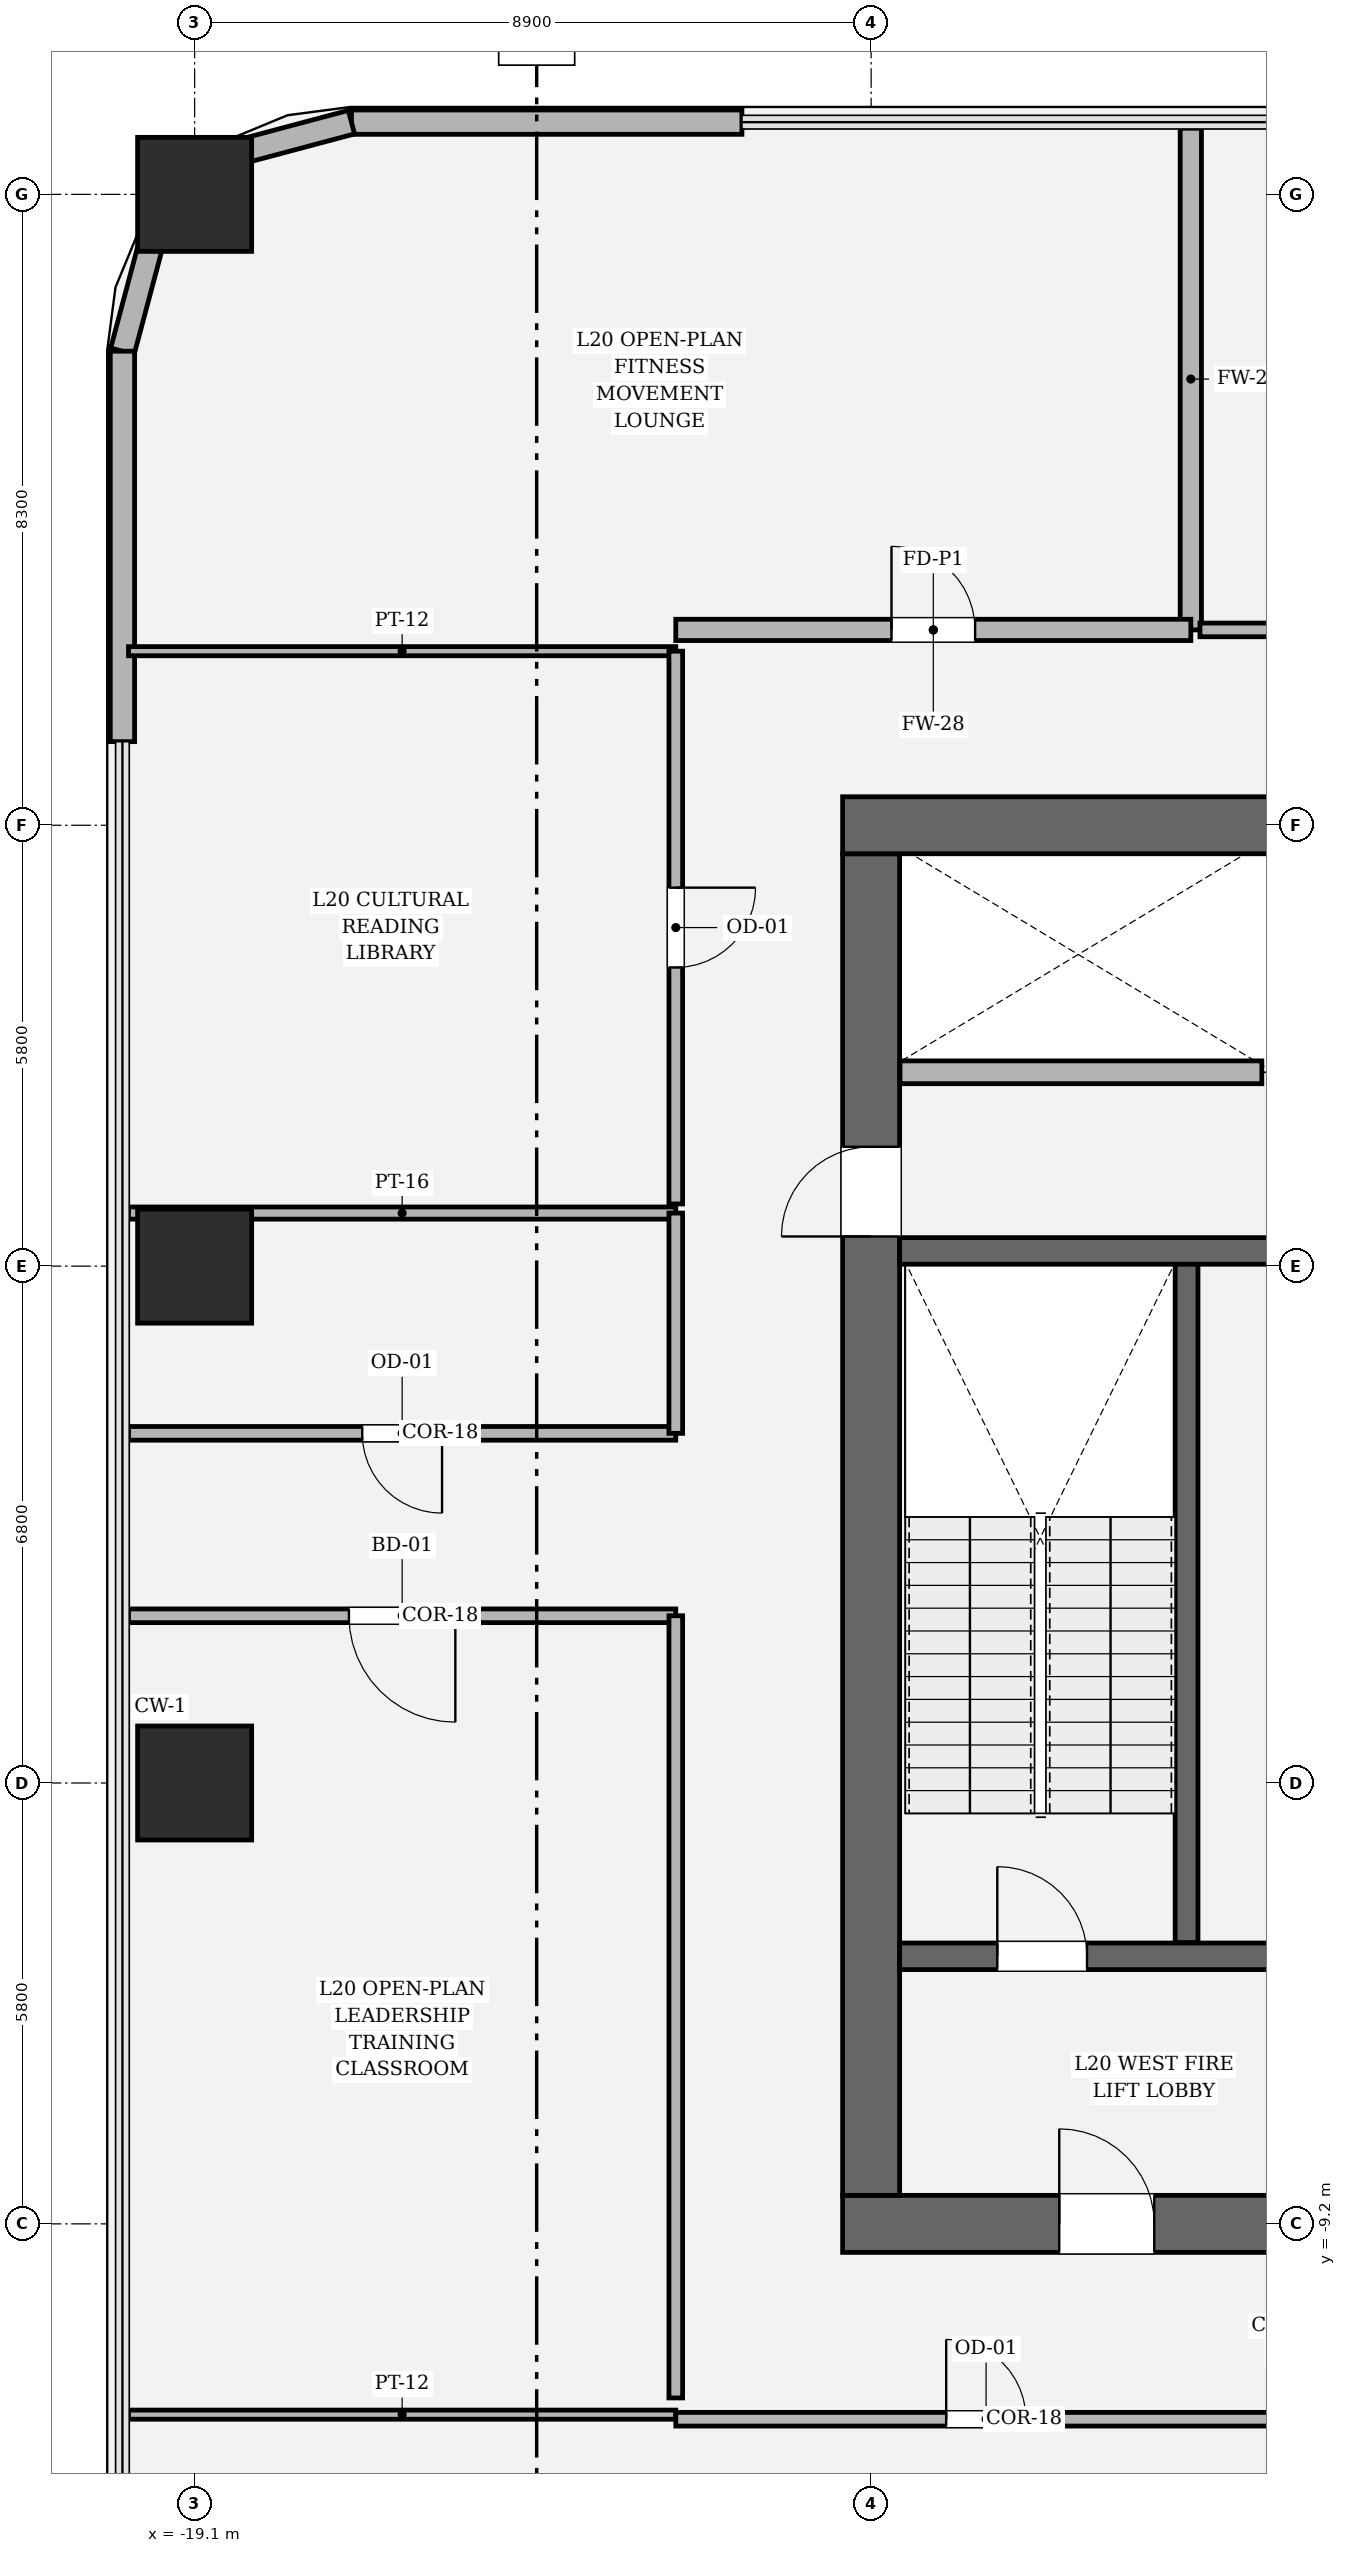
"""IFC4 building model, lengths in metres.
Left out: names, types, materials, properties, quantities, classifications, styles, units other than length and angle.
Written with IfcOpenShell. Run it as: python <this file> out.ifc"""

import sys

from ifc_helpers import new_model, si_unit, direction, frame, frame_2d, origin, origin_2d, place, context, subcontext, project, spatial, rectangle, hollow_rectangle, extrude, element, fill, save


model = new_model("IFC4")
c1 = context("Model", 3, precision=1e-05, world=origin(), true_north=direction((0.0, 1.0)))
c2 = subcontext(c1, "Body", "Model", "MODEL_VIEW")
j1 = project(units=[si_unit("LENGTHUNIT", "METRE"), si_unit("PLANEANGLEUNIT", "RADIAN")], contexts=[c1])
p1 = place(None, origin())
s1 = spatial("IfcSite", under=j1, at=p1, CompositionType="ELEMENT")
p2 = place(p1, origin())
s2 = spatial("IfcBuilding", under=s1, at=p2, CompositionType="ELEMENT")
p3 = place(p2, frame((0.0, 0.0, 88.95)))
s3 = spatial("IfcBuildingStorey", under=s2, at=p3, CompositionType="ELEMENT", Elevation=88.95)
p4 = place(p3, frame((10.575, -9.2, 0.0), z_axis=(0.0, 0.0, 1.0), x_axis=(-1.0, 0.0, 0.0)))
e1 = element("IfcWall", 1, at=p4, inside=s3, PredefinedType="SHEAR", context=c2, shape_type="SweptSolid", body=[
    extrude(rectangle(XDim=21.15, YDim=0.75, at=frame_2d((10.575, 0.0))), origin(), (0.0, 0.0, 1.0), 4.05),
])
p5 = place(p4, frame((2.85, 0.0, 0.0)))
e2 = element("IfcOpeningElement", 2, at=p5, cuts=e1, PredefinedType="OPENING", context=c2, shape_type="SweptSolid", body=[
    extrude(rectangle(XDim=1.25, YDim=2.25, at=frame_2d((0.625, 1.125))), frame((0.0, 0.385, 0.0), z_axis=(0.0, -1.0, 0.0), x_axis=(1.0, 0.0, 0.0)), (0.0, 0.0, 1.0), 0.77),
])
p6 = place(p4, frame((17.05, 0.0, 0.0)))
e3 = element("IfcOpeningElement", 3, at=p6, cuts=e1, PredefinedType="OPENING", context=c2, shape_type="SweptSolid", body=[
    extrude(rectangle(XDim=1.25, YDim=2.25, at=frame_2d((0.625, 1.125))), frame((0.0, 0.385, 0.0), z_axis=(0.0, -1.0, 0.0), x_axis=(1.0, 0.0, 0.0)), (0.0, 0.0, 1.0), 0.77),
])
p7 = place(p3, frame((-10.2, -8.825, 0.0), z_axis=(0.0, 0.0, 1.0), x_axis=(0.0, 1.0, 0.0)))
e4 = element("IfcWall", 4, at=p7, inside=s3, PredefinedType="SHEAR", context=c2, shape_type="SweptSolid", body=[
    extrude(rectangle(XDim=17.65, YDim=0.75, at=frame_2d((8.825, 0.0))), origin(), (0.0, 0.0, 1.0), 4.05),
])
p8 = place(p7, frame((12.615, 0.0, 0.0)))
e5 = element("IfcOpeningElement", 5, at=p8, cuts=e4, PredefinedType="OPENING", context=c2, shape_type="SweptSolid", body=[
    extrude(rectangle(XDim=1.18, YDim=2.2, at=frame_2d((0.59, 1.1))), frame((0.0, 0.385, 0.0), z_axis=(0.0, -1.0, 0.0), x_axis=(1.0, 0.0, 0.0)), (0.0, 0.0, 1.0), 0.77),
])
p9 = place(p3, frame((-10.575, 9.2, 0.0), z_axis=(0.0, 0.0, 1.0), x_axis=(1.0, 0.0, 0.0)))
e6 = element("IfcWall", 6, at=p9, inside=s3, PredefinedType="SHEAR", context=c2, shape_type="SweptSolid", body=[
    extrude(rectangle(XDim=21.15, YDim=0.75, at=frame_2d((10.575, 0.0))), origin(), (0.0, 0.0, 1.0), 4.05),
])
p10 = place(p3, frame((-6.05, -5.5, 0.0), z_axis=(0.0, 0.0, 1.0), x_axis=(0.0, 1.0, 0.0)))
e7 = element("IfcWall", 7, at=p10, inside=s3, PredefinedType="SOLIDWALL", context=c2, shape_type="SweptSolid", body=[
    extrude(rectangle(XDim=8.95, YDim=0.3, at=frame_2d((4.475, 0.0))), origin(), (0.0, 0.0, 1.0), 4.05),
])
p11 = place(p3, frame((-9.825, -5.68, 0.0), z_axis=(0.0, 0.0, 1.0), x_axis=(1.0, 0.0, 0.0)))
e8 = element("IfcWall", 8, at=p11, inside=s3, PredefinedType="SOLIDWALL", context=c2, shape_type="SweptSolid", body=[
    extrude(rectangle(XDim=5.175, YDim=0.35, at=frame_2d((2.587, 0.0))), origin(), (0.0, 0.0, 1.0), 4.05),
])
p12 = place(p11, frame((1.285, 0.0, 0.0)))
e9 = element("IfcOpeningElement", 9, at=p12, cuts=e8, PredefinedType="OPENING", context=c2, shape_type="SweptSolid", body=[
    extrude(rectangle(XDim=1.18, YDim=2.2, at=frame_2d((0.59, 1.1))), frame((0.0, 0.185, 0.0), z_axis=(0.0, -1.0, 0.0), x_axis=(1.0, 0.0, 0.0)), (0.0, 0.0, 1.0), 0.37),
])
p13 = place(p3, frame((-9.825, 3.6, 0.0), z_axis=(0.0, 0.0, 1.0), x_axis=(1.0, 0.0, 0.0)))
e10 = element("IfcWall", 10, at=p13, inside=s3, PredefinedType="SOLIDWALL", context=c2, shape_type="SweptSolid", body=[
    extrude(rectangle(XDim=5.175, YDim=0.35, at=frame_2d((2.587, 0.0))), origin(), (0.0, 0.0, 1.0), 4.05),
])
for number, where, z_axis, x_axis in (
    (11, (-19.1, 17.5, 0.0), (0.0, 0.0, 1.0), (1.0, 0.0, 0.0)),
    (12, (-19.1, 3.4, 0.0), (0.0, 0.0, 1.0), (1.0, 0.0, 0.0)),
    (13, (-19.1, -3.4, 0.0), (0.0, 0.0, 1.0), (1.0, 0.0, 0.0)),
):
    element("IfcColumn", number, at=place(p3, frame(where, z_axis=z_axis, x_axis=x_axis)), inside=s3, PredefinedType="COLUMN", context=c2, shape_type="SweptSolid", body=[
        extrude(hollow_rectangle(XDim=1.5, YDim=1.5, WallThickness=0.045, at=origin_2d()), origin(), (0.0, 0.0, 1.0), 4.05),
    ])
p14 = place(p3, frame((-11.9, 18.45, 0.0), z_axis=(0.0, 0.0, 1.0), x_axis=(-1.0, 0.0, 0.0)))
e14 = element("IfcWall", 14, at=p14, inside=s3, PredefinedType="SOLIDWALL", context=c2, shape_type="SweptSolid", body=[
    extrude(rectangle(XDim=5.137, YDim=0.32, at=frame_2d((2.568, 0.0))), origin(), (0.0, 0.0, 1.0), 3.77),
])
p15 = place(p3, frame((-17.037, 18.45, 0.0), z_axis=(0.0, 0.0, 1.0), x_axis=(-0.966224582397, -0.257701486942, 0.0)))
e15 = element("IfcWall", 15, at=p15, inside=s3, PredefinedType="SOLIDWALL", context=c2, shape_type="SweptSolid", body=[
    extrude(rectangle(XDim=1.565, YDim=0.32, at=frame_2d((0.783, 0.0))), origin(), (0.0, 0.0, 1.0), 3.77),
])
p16 = place(p3, frame((-18.549, 18.047, 0.0), z_axis=(0.0, 0.0, 1.0), x_axis=(-0.707106781187, -0.707106781187, 0.0)))
e16 = element("IfcWall", 16, at=p16, inside=s3, PredefinedType="SOLIDWALL", context=c2, shape_type="SweptSolid", body=[
    extrude(rectangle(XDim=1.552, YDim=0.32, at=frame_2d((0.776, 0.0))), origin(), (0.0, 0.0, 1.0), 2.444),
])
p17 = place(p3, frame((-19.646, 16.949, 0.0), z_axis=(0.0, 0.0, 1.0), x_axis=(-0.257847112249, -0.966185730957, 0.0)))
e17 = element("IfcWall", 17, at=p17, inside=s3, PredefinedType="SOLIDWALL", context=c2, shape_type="SweptSolid", body=[
    extrude(rectangle(XDim=1.565, YDim=0.32, at=frame_2d((0.783, 0.0))), origin(), (0.0, 0.0, 1.0), 3.77),
])
p18 = place(p3, frame((-20.05, 15.437, 0.0), z_axis=(0.0, 0.0, 1.0), x_axis=(0.0, -1.0, 0.0)))
e18 = element("IfcWall", 18, at=p18, inside=s3, PredefinedType="SOLIDWALL", context=c2, shape_type="SweptSolid", body=[
    extrude(rectangle(XDim=5.137, YDim=0.32, at=frame_2d((2.568, 0.0))), origin(), (0.0, 0.0, 1.0), 3.77),
])
p19 = place(p3, frame((-9.82, 5.95, 0.0), z_axis=(0.0, 0.0, 1.0), x_axis=(1.0, 0.0, 0.0)))
e19 = element("IfcWall", 19, at=p19, inside=s3, PredefinedType="SOLIDWALL", context=c2, shape_type="SweptSolid", body=[
    extrude(rectangle(XDim=4.76, YDim=0.3, at=frame_2d((2.38, 0.0))), origin(), (0.0, 0.0, 1.0), 3.77),
])
p20 = place(p3, frame((-19.97, -11.71, 0.0), z_axis=(0.0, 0.0, 1.0), x_axis=(1.0, 0.0, 0.0)))
e20 = element("IfcWall", 20, at=p20, inside=s3, PredefinedType="PARTITIONING", context=c2, shape_type="SweptSolid", body=[
    extrude(rectangle(XDim=7.2, YDim=0.12, at=frame_2d((3.6, 0.0))), origin(), (0.0, 0.0, 1.0), 2.444),
])
p21 = place(p3, frame((-12.77, -11.77, 0.0), z_axis=(0.0, 0.0, 1.0), x_axis=(1.0, 0.0, 0.0)))
e21 = element("IfcWall", 21, at=p21, inside=s3, PredefinedType="PARTITIONING", context=c2, shape_type="SweptSolid", body=[
    extrude(rectangle(XDim=8.165, YDim=0.18, at=frame_2d((4.083, 0.0))), origin(), (0.0, 0.0, 1.0), 2.444),
])
p22 = place(p21, frame((3.558, 0.0, 0.0)))
e22 = element("IfcOpeningElement", 22, at=p22, cuts=e21, PredefinedType="OPENING", context=c2, shape_type="SweptSolid", body=[
    extrude(rectangle(XDim=1.05, YDim=2.2, at=frame_2d((0.525, 1.1))), frame((0.0, 0.1, 0.0), z_axis=(0.0, -1.0, 0.0), x_axis=(1.0, 0.0, 0.0)), (0.0, 0.0, 1.0), 0.2),
])
p23 = place(p3, frame((-19.97, -1.2, 0.0), z_axis=(0.0, 0.0, 1.0), x_axis=(1.0, 0.0, 0.0)))
e23 = element("IfcWall", 23, at=p23, inside=s3, PredefinedType="PARTITIONING", context=c2, shape_type="SweptSolid", body=[
    extrude(rectangle(XDim=7.2, YDim=0.18, at=frame_2d((3.6, 0.0))), origin(), (0.0, 0.0, 1.0), 2.444),
])
p24 = place(p23, frame((2.9, 0.0, 0.0)))
e24 = element("IfcOpeningElement", 24, at=p24, cuts=e23, PredefinedType="OPENING", context=c2, shape_type="SweptSolid", body=[
    extrude(rectangle(XDim=1.4, YDim=2.25, at=frame_2d((0.7, 1.125))), frame((0.0, 0.1, 0.0), z_axis=(0.0, -1.0, 0.0), x_axis=(1.0, 0.0, 0.0)), (0.0, 0.0, 1.0), 0.2),
])
p25 = place(p3, frame((-12.77, -1.2, 0.0), z_axis=(0.0, 0.0, 1.0), x_axis=(0.0, -1.0, 0.0)))
e25 = element("IfcWall", 25, at=p25, inside=s3, PredefinedType="PARTITIONING", context=c2, shape_type="SweptSolid", body=[
    extrude(rectangle(XDim=10.29, YDim=0.18, at=frame_2d((5.145, 0.0))), origin(), (0.0, 0.0, 1.0), 2.444),
])
p26 = place(p3, frame((-12.77, 1.2, 0.0), z_axis=(0.0, 0.0, 1.0), x_axis=(-1.0, 0.0, 0.0)))
e26 = element("IfcWall", 26, at=p26, inside=s3, PredefinedType="PARTITIONING", context=c2, shape_type="SweptSolid", body=[
    extrude(rectangle(XDim=7.2, YDim=0.18, at=frame_2d((3.6, 0.0))), origin(), (0.0, 0.0, 1.0), 2.444),
])
p27 = place(p26, frame((3.075, 0.0, 0.0)))
e27 = element("IfcOpeningElement", 27, at=p27, cuts=e26, PredefinedType="OPENING", context=c2, shape_type="SweptSolid", body=[
    extrude(rectangle(XDim=1.05, YDim=2.2, at=frame_2d((0.525, 1.1))), frame((0.0, 0.1, 0.0), z_axis=(0.0, -1.0, 0.0), x_axis=(1.0, 0.0, 0.0)), (0.0, 0.0, 1.0), 0.2),
])
p28 = place(p3, frame((-19.97, 4.098, 0.0), z_axis=(0.0, 0.0, 1.0), x_axis=(1.0, 0.0, 0.0)))
e28 = element("IfcWall", 28, at=p28, inside=s3, PredefinedType="PARTITIONING", context=c2, shape_type="SweptSolid", body=[
    extrude(rectangle(XDim=7.2, YDim=0.16, at=frame_2d((3.6, 0.0))), origin(), (0.0, 0.0, 1.0), 2.444),
])
p29 = place(p3, frame((-12.77, 4.098, 0.0), z_axis=(0.0, 0.0, 1.0), x_axis=(0.0, -1.0, 0.0)))
e29 = element("IfcWall", 29, at=p29, inside=s3, PredefinedType="PARTITIONING", context=c2, shape_type="SweptSolid", body=[
    extrude(rectangle(XDim=2.898, YDim=0.18, at=frame_2d((1.449, 0.0))), origin(), (0.0, 0.0, 1.0), 2.444),
])
p30 = place(p3, frame((-19.97, 11.49, 0.0), z_axis=(0.0, 0.0, 1.0), x_axis=(1.0, 0.0, 0.0)))
e30 = element("IfcWall", 30, at=p30, inside=s3, PredefinedType="PARTITIONING", context=c2, shape_type="SweptSolid", body=[
    extrude(rectangle(XDim=7.2, YDim=0.12, at=frame_2d((3.6, 0.0))), origin(), (0.0, 0.0, 1.0), 2.444),
])
p31 = place(p3, frame((-12.77, 11.49, 0.0), z_axis=(0.0, 0.0, 1.0), x_axis=(0.0, -1.0, 0.0)))
e31 = element("IfcWall", 31, at=p31, inside=s3, PredefinedType="PARTITIONING", context=c2, shape_type="SweptSolid", body=[
    extrude(rectangle(XDim=7.272, YDim=0.18, at=frame_2d((3.636, 0.0))), origin(), (0.0, 0.0, 1.0), 2.444),
])
p32 = place(p31, frame((3.111, 0.0, 0.0)))
e32 = element("IfcOpeningElement", 32, at=p32, cuts=e31, PredefinedType="OPENING", context=c2, shape_type="SweptSolid", body=[
    extrude(rectangle(XDim=1.05, YDim=2.2, at=frame_2d((0.525, 1.1))), frame((0.0, 0.1, 0.0), z_axis=(0.0, -1.0, 0.0), x_axis=(1.0, 0.0, 0.0)), (0.0, 0.0, 1.0), 0.2),
])
p33 = place(p3, frame((-5.994, 18.37, 0.0), z_axis=(0.0, 0.0, 1.0), x_axis=(0.0, -1.0, 0.0)))
e33 = element("IfcWall", 33, at=p33, inside=s3, PredefinedType="SOLIDWALL", context=c2, shape_type="SweptSolid", body=[
    extrude(rectangle(XDim=6.6, YDim=0.28, at=frame_2d((3.3, 0.0))), origin(), (0.0, 0.0, 1.0), 2.444),
])
p34 = place(p3, frame((-5.994, 11.77, 0.0), z_axis=(0.0, 0.0, 1.0), x_axis=(-1.0, 0.0, 0.0)))
e34 = element("IfcWall", 34, at=p34, inside=s3, PredefinedType="SOLIDWALL", context=c2, shape_type="SweptSolid", body=[
    extrude(rectangle(XDim=6.776, YDim=0.28, at=frame_2d((3.388, 0.0))), origin(), (0.0, 0.0, 1.0), 2.444),
])
p35 = place(p34, frame((2.838, 0.0, 0.0)))
e35 = element("IfcOpeningElement", 35, at=p35, cuts=e34, PredefinedType="OPENING", context=c2, shape_type="SweptSolid", body=[
    extrude(rectangle(XDim=1.1, YDim=2.2, at=frame_2d((0.55, 1.1))), frame((0.0, 0.15, 0.0), z_axis=(0.0, -1.0, 0.0), x_axis=(1.0, 0.0, 0.0)), (0.0, 0.0, 1.0), 0.3),
])
p36 = place(p3, frame((12.77, 11.77, 0.0), z_axis=(0.0, 0.0, 1.0), x_axis=(-1.0, 0.0, 0.0)))
e36 = element("IfcWall", 36, at=p36, inside=s3, PredefinedType="PARTITIONING", context=c2, shape_type="SweptSolid", body=[
    extrude(rectangle(XDim=18.644, YDim=0.18, at=frame_2d((9.322, 0.0))), origin(), (0.0, 0.0, 1.0), 2.444),
])
p37 = place(p36, frame((8.622, 0.0, 0.0)))
e37 = element("IfcOpeningElement", 37, at=p37, cuts=e36, PredefinedType="OPENING", context=c2, shape_type="SweptSolid", body=[
    extrude(rectangle(XDim=1.4, YDim=2.25, at=frame_2d((0.7, 1.125))), frame((0.0, 0.1, 0.0), z_axis=(0.0, -1.0, 0.0), x_axis=(1.0, 0.0, 0.0)), (0.0, 0.0, 1.0), 0.2),
])
p38 = place(p12, origin())
e38 = element("IfcDoor", 38, at=p38, inside=s3, OperationType="SINGLE_SWING_LEFT", PredefinedType="DOOR", context=c2, shape_type="SweptSolid", body=[
    extrude(rectangle(XDim=1.18, YDim=2.2, at=frame_2d((0.59, 1.1))), frame((0.0, 0.025, 0.0), z_axis=(0.0, -1.0, 0.0), x_axis=(1.0, 0.0, 0.0)), (0.0, 0.0, 1.0), 0.05),
])
fill(e9, e38)
p39 = place(p6, origin())
e39 = element("IfcDoor", 39, at=p39, inside=s3, OperationType="SINGLE_SWING_RIGHT", PredefinedType="DOOR", context=c2, shape_type="SweptSolid", body=[
    extrude(rectangle(XDim=1.25, YDim=2.25, at=frame_2d((0.625, 1.125))), frame((0.0, 0.025, 0.0), z_axis=(0.0, -1.0, 0.0), x_axis=(1.0, 0.0, 0.0)), (0.0, 0.0, 1.0), 0.05),
])
fill(e3, e39)
p40 = place(p8, origin())
e40 = element("IfcDoor", 40, at=p40, inside=s3, OperationType="SINGLE_SWING_LEFT", PredefinedType="DOOR", context=c2, shape_type="SweptSolid", body=[
    extrude(rectangle(XDim=1.18, YDim=2.2, at=frame_2d((0.59, 1.1))), frame((0.0, 0.025, 0.0), z_axis=(0.0, -1.0, 0.0), x_axis=(1.0, 0.0, 0.0)), (0.0, 0.0, 1.0), 0.05),
])
fill(e5, e40)
p41 = place(p22, origin())
e41 = element("IfcDoor", 41, at=p41, inside=s3, OperationType="SINGLE_SWING_LEFT", PredefinedType="DOOR", context=c2, shape_type="SweptSolid", body=[
    extrude(rectangle(XDim=1.05, YDim=2.2, at=frame_2d((0.525, 1.1))), frame((0.0, 0.025, 0.0), z_axis=(0.0, -1.0, 0.0), x_axis=(1.0, 0.0, 0.0)), (0.0, 0.0, 1.0), 0.05),
])
fill(e22, e41)
p42 = place(p24, origin())
e42 = element("IfcDoor", 42, at=p42, inside=s3, OperationType="SINGLE_SWING_RIGHT", PredefinedType="DOOR", context=c2, shape_type="SweptSolid", body=[
    extrude(rectangle(XDim=1.4, YDim=2.25, at=frame_2d((0.7, 1.125))), frame((0.0, 0.025, 0.0), z_axis=(0.0, -1.0, 0.0), x_axis=(1.0, 0.0, 0.0)), (0.0, 0.0, 1.0), 0.05),
])
fill(e24, e42)
p43 = place(p27, origin())
e43 = element("IfcDoor", 43, at=p43, inside=s3, OperationType="SINGLE_SWING_LEFT", PredefinedType="DOOR", context=c2, shape_type="SweptSolid", body=[
    extrude(rectangle(XDim=1.05, YDim=2.2, at=frame_2d((0.525, 1.1))), frame((0.0, 0.025, 0.0), z_axis=(0.0, -1.0, 0.0), x_axis=(1.0, 0.0, 0.0)), (0.0, 0.0, 1.0), 0.05),
])
fill(e27, e43)
p44 = place(p32, origin())
e44 = element("IfcDoor", 44, at=p44, inside=s3, OperationType="SINGLE_SWING_LEFT", PredefinedType="DOOR", context=c2, shape_type="SweptSolid", body=[
    extrude(rectangle(XDim=1.05, YDim=2.2, at=frame_2d((0.525, 1.1))), frame((0.0, 0.025, 0.0), z_axis=(0.0, -1.0, 0.0), x_axis=(1.0, 0.0, 0.0)), (0.0, 0.0, 1.0), 0.05),
])
fill(e32, e44)
p45 = place(p35, origin())
e45 = element("IfcDoor", 45, at=p45, inside=s3, OperationType="SINGLE_SWING_RIGHT", PredefinedType="DOOR", context=c2, shape_type="SweptSolid", body=[
    extrude(rectangle(XDim=1.1, YDim=2.2, at=frame_2d((0.55, 1.1))), frame((0.0, 0.025, 0.0), z_axis=(0.0, -1.0, 0.0), x_axis=(1.0, 0.0, 0.0)), (0.0, 0.0, 1.0), 0.05),
])
fill(e35, e45)
save(model, sys.argv[1])
